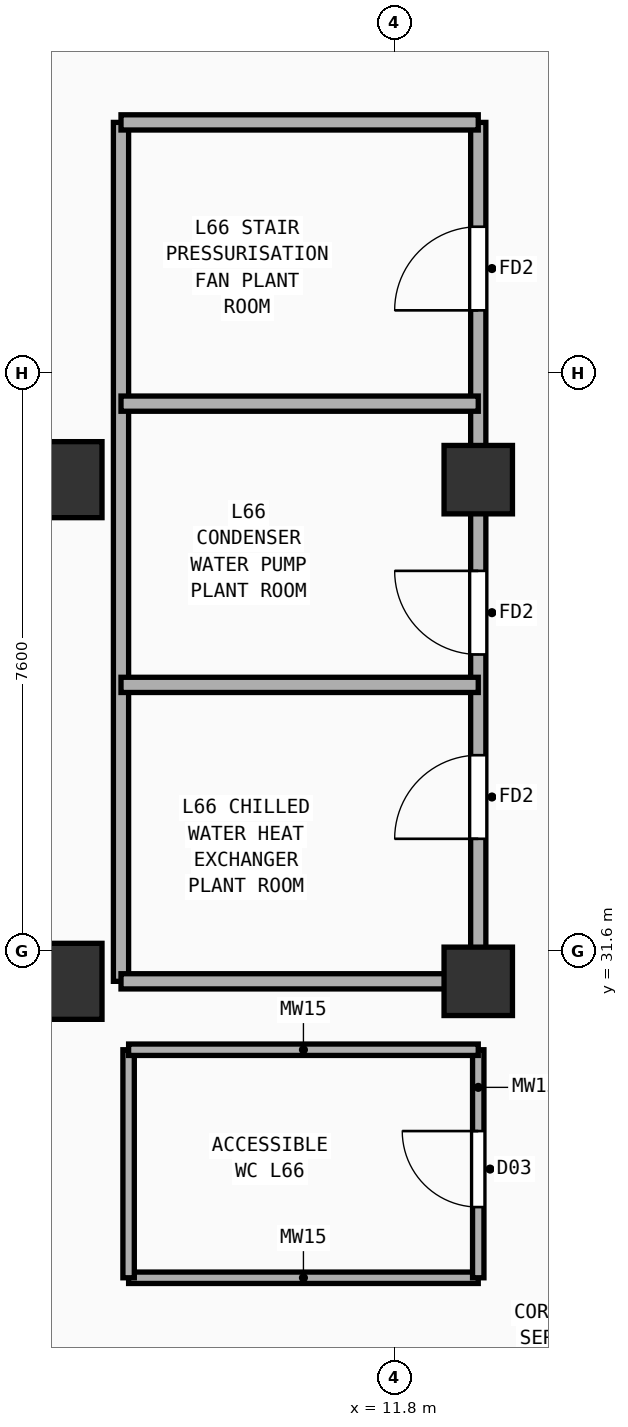
"""IFC4 building model, lengths in metres.
Left out: names, types, materials, properties, quantities, classifications, styles, units other than length and angle.
Written with IfcOpenShell. Run it as: python <this file> out.ifc"""

import sys

from ifc_helpers import new_model, si_unit, direction, frame, frame_2d, origin, origin_2d, place, context, subcontext, project, spatial, rectangle, extrude, element, fill, save


model = new_model("IFC4")
c1 = context("Model", 3, precision=1e-05, world=origin(), true_north=direction((0.0, 1.0)))
c2 = subcontext(c1, "Body", "Model", "MODEL_VIEW")
j1 = project(units=[si_unit("LENGTHUNIT", "METRE"), si_unit("PLANEANGLEUNIT", "RADIAN")], contexts=[c1])
p1 = place(None, origin())
s1 = spatial("IfcSite", under=j1, at=p1, CompositionType="ELEMENT")
p2 = place(p1, origin())
s2 = spatial("IfcBuilding", under=s1, at=p2, CompositionType="ELEMENT")
p3 = place(p2, frame((0.0, 0.0, 257.7)))
s3 = spatial("IfcBuildingStorey", under=s2, at=p3, CompositionType="ELEMENT", Elevation=257.7)
for number, where, z_axis, x_axis in (
    (1, (7.45, 31.2, 0.0), (0.0, 0.0, 1.0), (1.0, 0.0, 0.0)),
    (2, (7.45, 37.8, 0.0), (0.0, 0.0, 1.0), (1.0, 0.0, 0.0)),
):
    element("IfcColumn", number, at=place(p3, frame(where, z_axis=z_axis, x_axis=x_axis)), inside=s3, PredefinedType="COLUMN", context=c2, shape_type="SweptSolid", body=[
        extrude(rectangle(XDim=1.0, YDim=1.0, at=origin_2d()), origin(), (0.0, 0.0, 1.0), 4.86),
    ])
for number, where, z_axis, x_axis in (
    (3, (12.9, 31.2, 0.0), (0.0, 0.0, 1.0), (1.0, 0.0, 0.0)),
    (4, (12.9, 37.8, 0.0), (0.0, 0.0, 1.0), (1.0, 0.0, 0.0)),
):
    element("IfcColumn", number, at=place(p3, frame(where, z_axis=z_axis, x_axis=x_axis)), inside=s3, PredefinedType="COLUMN", context=c2, shape_type="SweptSolid", body=[
        extrude(rectangle(XDim=0.9, YDim=0.9, at=origin_2d()), origin(), (0.0, 0.0, 1.0), 4.86),
    ])
p4 = place(p3, frame((8.3, 27.3, 0.0), z_axis=(0.0, 0.0, 1.0), x_axis=(1.0, 0.0, 0.0)))
e5 = element("IfcWall", 5, at=p4, inside=s3, PredefinedType="PLUMBINGWALL", context=c2, shape_type="SweptSolid", body=[
    extrude(rectangle(XDim=4.6, YDim=0.15, at=frame_2d((2.3, 0.0))), origin(), (0.0, 0.0, 1.0), 4.86),
])
p5 = place(p3, frame((8.3, 27.3, 0.0), z_axis=(0.0, 0.0, 1.0), x_axis=(0.0, 1.0, 0.0)))
e6 = element("IfcWall", 6, at=p5, inside=s3, PredefinedType="PLUMBINGWALL", context=c2, shape_type="SweptSolid", body=[
    extrude(rectangle(XDim=3.0, YDim=0.15, at=frame_2d((1.5, 0.0))), origin(), (0.0, 0.0, 1.0), 4.86),
])
p6 = place(p3, frame((12.9, 27.3, 0.0), z_axis=(0.0, 0.0, 1.0), x_axis=(0.0, 1.0, 0.0)))
e7 = element("IfcWall", 7, at=p6, inside=s3, PredefinedType="PLUMBINGWALL", context=c2, shape_type="SweptSolid", body=[
    extrude(rectangle(XDim=3.0, YDim=0.15, at=frame_2d((1.5, 0.0))), origin(), (0.0, 0.0, 1.0), 4.06),
])
p7 = place(p6, frame((0.93, 0.0, 0.0)))
e8 = element("IfcOpeningElement", 8, at=p7, cuts=e7, PredefinedType="OPENING", context=c2, shape_type="SweptSolid", body=[
    extrude(rectangle(XDim=1.0, YDim=2.2, at=frame_2d((0.5, 1.1))), frame((0.0, 0.085, 0.0), z_axis=(0.0, -1.0, 0.0), x_axis=(1.0, 0.0, 0.0)), (0.0, 0.0, 1.0), 0.17),
])
p8 = place(p3, frame((8.3, 30.3, 0.0), z_axis=(0.0, 0.0, 1.0), x_axis=(1.0, 0.0, 0.0)))
e9 = element("IfcWall", 9, at=p8, inside=s3, PredefinedType="PLUMBINGWALL", context=c2, shape_type="SweptSolid", body=[
    extrude(rectangle(XDim=4.6, YDim=0.15, at=frame_2d((2.3, 0.0))), origin(), (0.0, 0.0, 1.0), 4.86),
])
p9 = place(p3, frame((12.9, 31.2, 0.0), z_axis=(0.0, 0.0, 1.0), x_axis=(0.0, 1.0, 0.0)))
e10 = element("IfcWall", 10, at=p9, inside=s3, PredefinedType="PARTITIONING", context=c2, shape_type="SweptSolid", body=[
    extrude(rectangle(XDim=11.3, YDim=0.2, at=frame_2d((5.65, 0.0))), origin(), (0.0, 0.0, 1.0), 4.06),
])
p10 = place(p9, frame((1.875, 0.0, 0.0)))
e11 = element("IfcOpeningElement", 11, at=p10, cuts=e10, PredefinedType="OPENING", context=c2, shape_type="SweptSolid", body=[
    extrude(rectangle(XDim=1.1, YDim=2.2, at=frame_2d((0.55, 1.1))), frame((0.0, 0.11, 0.0), z_axis=(0.0, -1.0, 0.0), x_axis=(1.0, 0.0, 0.0)), (0.0, 0.0, 1.0), 0.22),
])
p11 = place(p9, frame((4.3, 0.0, 0.0)))
e12 = element("IfcOpeningElement", 12, at=p11, cuts=e10, PredefinedType="OPENING", context=c2, shape_type="SweptSolid", body=[
    extrude(rectangle(XDim=1.1, YDim=2.2, at=frame_2d((0.55, 1.1))), frame((0.0, 0.11, 0.0), z_axis=(0.0, -1.0, 0.0), x_axis=(1.0, 0.0, 0.0)), (0.0, 0.0, 1.0), 0.22),
])
p12 = place(p9, frame((8.827, 0.0, 0.0)))
e13 = element("IfcOpeningElement", 13, at=p12, cuts=e10, PredefinedType="OPENING", context=c2, shape_type="SweptSolid", body=[
    extrude(rectangle(XDim=1.1, YDim=2.2, at=frame_2d((0.55, 1.1))), frame((0.0, 0.11, 0.0), z_axis=(0.0, -1.0, 0.0), x_axis=(1.0, 0.0, 0.0)), (0.0, 0.0, 1.0), 0.22),
])
p13 = place(p3, frame((8.2, 31.2, 0.0), z_axis=(0.0, 0.0, 1.0), x_axis=(0.0, 1.0, 0.0)))
e14 = element("IfcWall", 14, at=p13, inside=s3, PredefinedType="PARTITIONING", context=c2, shape_type="SweptSolid", body=[
    extrude(rectangle(XDim=11.3, YDim=0.2, at=frame_2d((5.65, 0.0))), origin(), (0.0, 0.0, 1.0), 4.86),
])
p14 = place(p3, frame((8.2, 31.2, 0.0), z_axis=(0.0, 0.0, 1.0), x_axis=(1.0, 0.0, 0.0)))
e15 = element("IfcWall", 15, at=p14, inside=s3, PredefinedType="PARTITIONING", context=c2, shape_type="SweptSolid", body=[
    extrude(rectangle(XDim=4.7, YDim=0.2, at=frame_2d((2.35, 0.0))), origin(), (0.0, 0.0, 1.0), 4.06),
])
p15 = place(p3, frame((8.2, 42.5, 0.0), z_axis=(0.0, 0.0, 1.0), x_axis=(1.0, 0.0, 0.0)))
e16 = element("IfcWall", 16, at=p15, inside=s3, PredefinedType="PARTITIONING", context=c2, shape_type="SweptSolid", body=[
    extrude(rectangle(XDim=4.7, YDim=0.2, at=frame_2d((2.35, 0.0))), origin(), (0.0, 0.0, 1.0), 4.56),
])
for number, where, z_axis, x_axis in (
    (17, (8.2, 35.1, 0.0), (0.0, 0.0, 1.0), (1.0, 0.0, 0.0)),
    (18, (8.2, 38.8, 0.0), (0.0, 0.0, 1.0), (1.0, 0.0, 0.0)),
):
    element("IfcWall", number, at=place(p3, frame(where, z_axis=z_axis, x_axis=x_axis)), inside=s3, PredefinedType="PARTITIONING", context=c2, shape_type="SweptSolid", body=[
        extrude(rectangle(XDim=4.7, YDim=0.2, at=frame_2d((2.35, 0.0))), origin(), (0.0, 0.0, 1.0), 4.86),
    ])
p16 = place(p7, origin())
e19 = element("IfcDoor", 19, at=p16, inside=s3, OperationType="SINGLE_SWING_RIGHT", PredefinedType="DOOR", context=c2, shape_type="SweptSolid", body=[
    extrude(rectangle(XDim=1.0, YDim=2.2, at=frame_2d((0.5, 1.1))), frame((0.0, 0.025, 0.0), z_axis=(0.0, -1.0, 0.0), x_axis=(1.0, 0.0, 0.0)), (0.0, 0.0, 1.0), 0.05),
])
fill(e8, e19)
p17 = place(p10, origin())
e20 = element("IfcDoor", 20, at=p17, inside=s3, OperationType="SINGLE_SWING_LEFT", PredefinedType="DOOR", context=c2, shape_type="SweptSolid", body=[
    extrude(rectangle(XDim=1.1, YDim=2.2, at=frame_2d((0.55, 1.1))), frame((0.0, 0.025, 0.0), z_axis=(0.0, -1.0, 0.0), x_axis=(1.0, 0.0, 0.0)), (0.0, 0.0, 1.0), 0.05),
])
fill(e11, e20)
p18 = place(p11, origin())
e21 = element("IfcDoor", 21, at=p18, inside=s3, OperationType="SINGLE_SWING_RIGHT", PredefinedType="DOOR", context=c2, shape_type="SweptSolid", body=[
    extrude(rectangle(XDim=1.1, YDim=2.2, at=frame_2d((0.55, 1.1))), frame((0.0, 0.025, 0.0), z_axis=(0.0, -1.0, 0.0), x_axis=(1.0, 0.0, 0.0)), (0.0, 0.0, 1.0), 0.05),
])
fill(e12, e21)
p19 = place(p12, origin())
e22 = element("IfcDoor", 22, at=p19, inside=s3, OperationType="SINGLE_SWING_LEFT", PredefinedType="DOOR", context=c2, shape_type="SweptSolid", body=[
    extrude(rectangle(XDim=1.1, YDim=2.2, at=frame_2d((0.55, 1.1))), frame((0.0, 0.025, 0.0), z_axis=(0.0, -1.0, 0.0), x_axis=(1.0, 0.0, 0.0)), (0.0, 0.0, 1.0), 0.05),
])
fill(e13, e22)
save(model, sys.argv[1])
